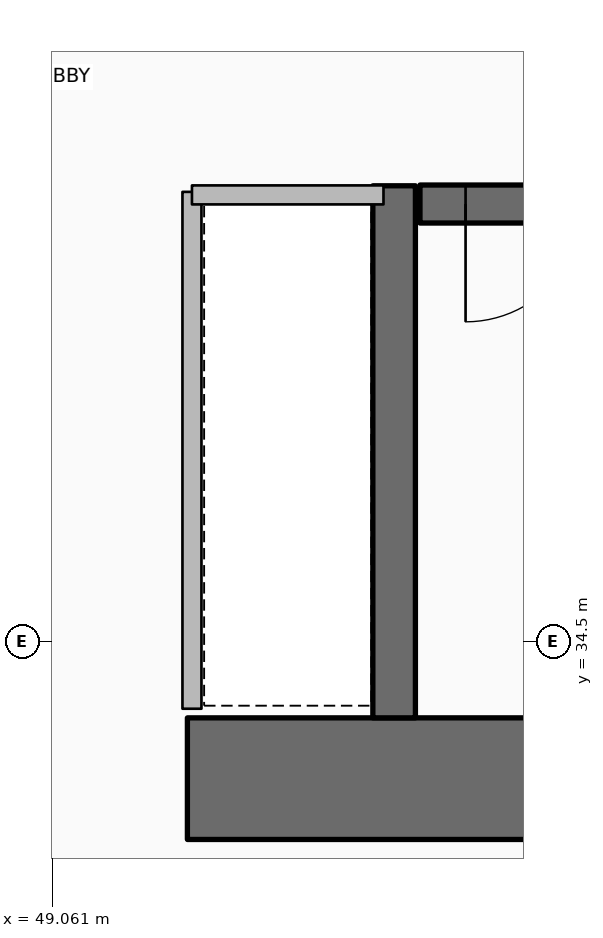
"""IFC4 building model, lengths in metres.
Left out: names, types, materials, properties, quantities, classifications, styles, units other than length and angle.
Written with IfcOpenShell. Run it as: python <this file> out.ifc"""

import sys

from ifc_helpers import new_model, si_unit, direction, frame, frame_2d, origin, place, context, subcontext, project, spatial, rectangle, extrude, element, fill, save


model = new_model("IFC4")
c1 = context("Model", 3, precision=1e-05, world=origin(), true_north=direction((0.0, 1.0)))
c2 = subcontext(c1, "Body", "Model", "MODEL_VIEW")
j1 = project(units=[si_unit("LENGTHUNIT", "METRE"), si_unit("PLANEANGLEUNIT", "RADIAN")], contexts=[c1])
p1 = place(None, origin())
s1 = spatial("IfcSite", under=j1, at=p1, CompositionType="ELEMENT")
p2 = place(p1, origin())
s2 = spatial("IfcBuilding", under=s1, at=p2, CompositionType="ELEMENT")
p3 = place(p2, frame((0.0, 0.0, 123.0)))
s3 = spatial("IfcBuildingStorey", under=s2, at=p3, CompositionType="ELEMENT", Elevation=123.0)
p4 = place(p3, frame((49.95, 33.6, 0.0), z_axis=(0.0, 0.0, 1.0), x_axis=(1.0, 0.0, 0.0)))
e1 = element("IfcWall", 1, at=p4, inside=s3, PredefinedType="SHEAR", context=c2, shape_type="SweptSolid", body=[
    extrude(rectangle(XDim=9.9, YDim=0.8, at=frame_2d((4.95, 0.0))), origin(), (0.0, 0.0, 1.0), 4.8),
])
p5 = place(p3, frame((51.31, 34.0, 0.0), z_axis=(0.0, 0.0, 1.0), x_axis=(0.0, 1.0, 0.0)))
e2 = element("IfcWall", 2, at=p5, inside=s3, PredefinedType="SHEAR", context=c2, shape_type="SweptSolid", body=[
    extrude(rectangle(XDim=3.5, YDim=0.28, at=frame_2d((1.75, 0.0))), origin(), (0.0, 0.0, 1.0), 4.8),
])
p6 = place(p3, frame((51.48, 37.38, 0.0), z_axis=(0.0, 0.0, 1.0), x_axis=(1.0, 0.0, 0.0)))
e3 = element("IfcWall", 3, at=p6, inside=s3, PredefinedType="SOLIDWALL", context=c2, shape_type="SweptSolid", body=[
    extrude(rectangle(XDim=7.54, YDim=0.25, at=frame_2d((3.77, 0.0))), origin(), (0.0, 0.0, 1.0), 4.4),
])
p7 = place(p6, frame((0.3, 0.0, 0.0)))
e4 = element("IfcOpeningElement", 4, at=p7, cuts=e3, PredefinedType="OPENING", context=c2, shape_type="SweptSolid", body=[
    extrude(rectangle(XDim=1.55, YDim=2.15, at=frame_2d((0.775, 1.075))), frame((0.0, 0.135, 0.0), z_axis=(0.0, -1.0, 0.0), x_axis=(1.0, 0.0, 0.0)), (0.0, 0.0, 1.0), 0.27),
])
p8 = place(p3, frame((49.98, 34.06, 0.0), z_axis=(0.0, 0.0, 1.0), x_axis=(0.0, 1.0, 0.0)))
e5 = element("IfcWall", 5, at=p8, inside=s3, PredefinedType="PARTITIONING", context=c2, shape_type="SweptSolid", body=[
    extrude(rectangle(XDim=3.4, YDim=0.125, at=frame_2d((1.7, 0.0))), origin(), (0.0, 0.0, 1.0), 3.84),
])
p9 = place(p3, frame((49.98, 37.44, 0.0), z_axis=(0.0, 0.0, 1.0), x_axis=(1.0, 0.0, 0.0)))
e6 = element("IfcWall", 6, at=p9, inside=s3, PredefinedType="PARTITIONING", context=c2, shape_type="SweptSolid", body=[
    extrude(rectangle(XDim=1.26, YDim=0.125, at=frame_2d((0.63, 0.0))), origin(), (0.0, 0.0, 1.0), 3.84),
])
p10 = place(p7, origin())
e7 = element("IfcDoor", 7, at=p10, inside=s3, OperationType="DOUBLE_DOOR_SINGLE_SWING", PredefinedType="DOOR", context=c2, shape_type="SweptSolid", body=[
    extrude(rectangle(XDim=1.55, YDim=2.15, at=frame_2d((0.775, 1.075))), frame((0.0, 0.025, 0.0), z_axis=(0.0, -1.0, 0.0), x_axis=(1.0, 0.0, 0.0)), (0.0, 0.0, 1.0), 0.05),
])
fill(e4, e7)
save(model, sys.argv[1])
